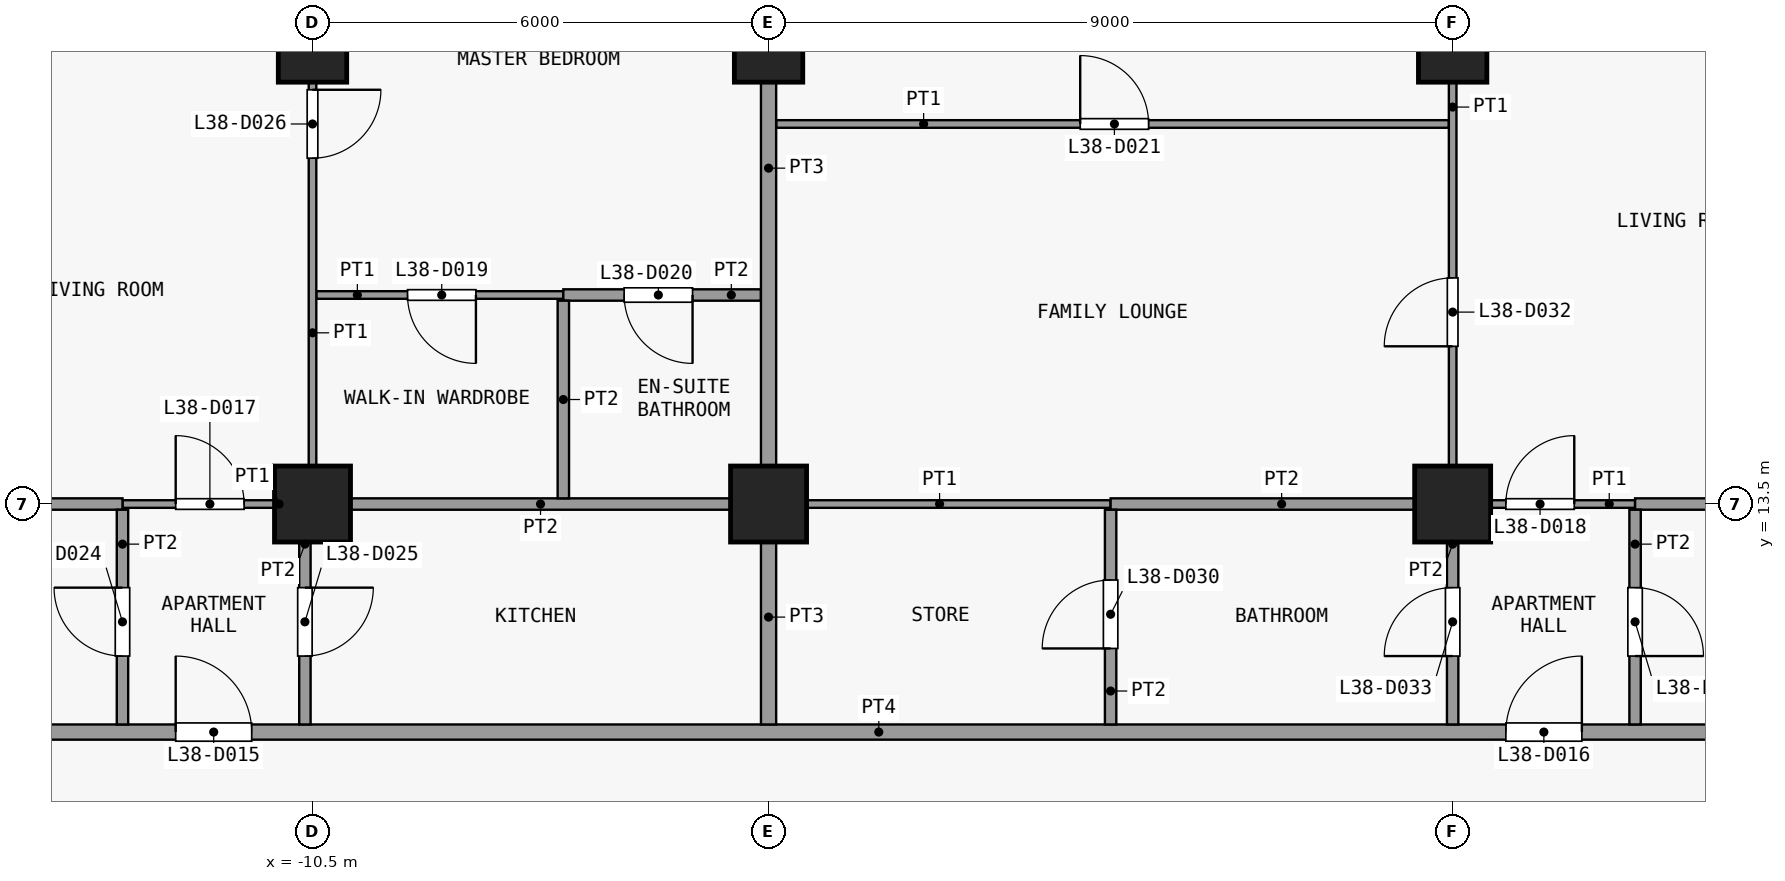
"""IFC4 building model, lengths in metres.
Left out: names, types, materials, properties, quantities, classifications, styles, units other than length and angle.
Written with IfcOpenShell. Run it as: python <this file> out.ifc"""

import sys

from ifc_helpers import new_model, si_unit, direction, frame, frame_2d, origin, origin_2d, place, context, subcontext, project, spatial, rectangle, extrude, element, fill, save


model = new_model("IFC4")
c1 = context("Model", 3, precision=1e-05, world=origin(), true_north=direction((0.0, 1.0)))
c2 = subcontext(c1, "Body", "Model", "MODEL_VIEW")
j1 = project(units=[si_unit("LENGTHUNIT", "METRE"), si_unit("PLANEANGLEUNIT", "RADIAN")], contexts=[c1])
p1 = place(None, origin())
s1 = spatial("IfcSite", under=j1, at=p1, CompositionType="ELEMENT")
p2 = place(p1, origin())
s2 = spatial("IfcBuilding", under=s1, at=p2, CompositionType="ELEMENT")
p3 = place(p2, frame((0.0, 0.0, 156.5)))
s3 = spatial("IfcBuildingStorey", under=s2, at=p3, CompositionType="ELEMENT", Elevation=156.5)
p4 = place(p3, frame((-10.5, 13.5, 0.0), z_axis=(0.0, 0.0, 1.0), x_axis=(1.0, 0.0, 0.0)))
e1 = element("IfcColumn", 1, at=p4, inside=s3, PredefinedType="COLUMN", context=c2, shape_type="SweptSolid", body=[
    extrude(rectangle(XDim=1.0, YDim=1.0, at=origin_2d()), origin(), (0.0, 0.0, 1.0), 3.6),
])
p5 = place(p3, frame((-10.5, 19.5, 0.0), z_axis=(0.0, 0.0, 1.0), x_axis=(1.0, 0.0, 0.0)))
e2 = element("IfcColumn", 2, at=p5, inside=s3, PredefinedType="COLUMN", context=c2, shape_type="SweptSolid", body=[
    extrude(rectangle(XDim=0.9, YDim=0.9, at=origin_2d()), origin(), (0.0, 0.0, 1.0), 3.6),
])
p6 = place(p3, frame((-4.5, 13.5, 0.0), z_axis=(0.0, 0.0, 1.0), x_axis=(1.0, 0.0, 0.0)))
e3 = element("IfcColumn", 3, at=p6, inside=s3, PredefinedType="COLUMN", context=c2, shape_type="SweptSolid", body=[
    extrude(rectangle(XDim=1.0, YDim=1.0, at=origin_2d()), origin(), (0.0, 0.0, 1.0), 3.6),
])
p7 = place(p3, frame((-4.5, 19.5, 0.0), z_axis=(0.0, 0.0, 1.0), x_axis=(1.0, 0.0, 0.0)))
e4 = element("IfcColumn", 4, at=p7, inside=s3, PredefinedType="COLUMN", context=c2, shape_type="SweptSolid", body=[
    extrude(rectangle(XDim=0.9, YDim=0.9, at=origin_2d()), origin(), (0.0, 0.0, 1.0), 3.6),
])
p8 = place(p3, frame((4.5, 13.5, 0.0), z_axis=(0.0, 0.0, 1.0), x_axis=(1.0, 0.0, 0.0)))
e5 = element("IfcColumn", 5, at=p8, inside=s3, PredefinedType="COLUMN", context=c2, shape_type="SweptSolid", body=[
    extrude(rectangle(XDim=1.0, YDim=1.0, at=origin_2d()), origin(), (0.0, 0.0, 1.0), 3.6),
])
p9 = place(p3, frame((4.5, 19.5, 0.0), z_axis=(0.0, 0.0, 1.0), x_axis=(1.0, 0.0, 0.0)))
e6 = element("IfcColumn", 6, at=p9, inside=s3, PredefinedType="COLUMN", context=c2, shape_type="SweptSolid", body=[
    extrude(rectangle(XDim=0.9, YDim=0.9, at=origin_2d()), origin(), (0.0, 0.0, 1.0), 3.6),
])
p10 = place(p3, frame((-19.35, 10.5, 0.0), z_axis=(0.0, 0.0, 1.0), x_axis=(1.0, 0.0, 0.0)))
e7 = element("IfcWall", 7, at=p10, inside=s3, PredefinedType="PARTITIONING", context=c2, shape_type="SweptSolid", body=[
    extrude(rectangle(XDim=37.2, YDim=0.2, at=frame_2d((18.6, 0.0))), origin(), (0.0, 0.0, 1.0), 3.3),
])
p11 = place(p10, frame((7.05, 0.0, 0.0)))
e8 = element("IfcOpeningElement", 8, at=p11, cuts=e7, PredefinedType="OPENING", context=c2, shape_type="SweptSolid", body=[
    extrude(rectangle(XDim=1.0, YDim=2.1, at=frame_2d((0.5, 1.05))), frame((0.0, 0.11, 0.0), z_axis=(0.0, -1.0, 0.0), x_axis=(1.0, 0.0, 0.0)), (0.0, 0.0, 1.0), 0.22),
])
p12 = place(p10, frame((24.55, 0.0, 0.0)))
e9 = element("IfcOpeningElement", 9, at=p12, cuts=e7, PredefinedType="OPENING", context=c2, shape_type="SweptSolid", body=[
    extrude(rectangle(XDim=1.0, YDim=2.1, at=frame_2d((0.5, 1.05))), frame((0.0, 0.11, 0.0), z_axis=(0.0, -1.0, 0.0), x_axis=(1.0, 0.0, 0.0)), (0.0, 0.0, 1.0), 0.22),
])
p13 = place(p3, frame((-13.0, 13.5, 0.0), z_axis=(0.0, 0.0, 1.0), x_axis=(1.0, 0.0, 0.0)))
e10 = element("IfcWall", 10, at=p13, inside=s3, PredefinedType="PARTITIONING", context=c2, shape_type="SweptSolid", body=[
    extrude(rectangle(XDim=2.4, YDim=0.1, at=frame_2d((1.2, 0.0))), origin(), (0.0, 0.0, 1.0), 3.3),
])
p14 = place(p13, frame((0.7, 0.0, 0.0)))
e11 = element("IfcOpeningElement", 11, at=p14, cuts=e10, PredefinedType="OPENING", context=c2, shape_type="SweptSolid", body=[
    extrude(rectangle(XDim=0.9, YDim=2.1, at=frame_2d((0.45, 1.05))), frame((0.0, 0.06, 0.0), z_axis=(0.0, -1.0, 0.0), x_axis=(1.0, 0.0, 0.0)), (0.0, 0.0, 1.0), 0.12),
])
p15 = place(p3, frame((-4.5, 13.5, 0.0), z_axis=(0.0, 0.0, 1.0), x_axis=(1.0, 0.0, 0.0)))
e12 = element("IfcWall", 12, at=p15, inside=s3, PredefinedType="PARTITIONING", context=c2, shape_type="SweptSolid", body=[
    extrude(rectangle(XDim=4.5, YDim=0.1, at=frame_2d((2.25, 0.0))), origin(), (0.0, 0.0, 1.0), 3.3),
])
p16 = place(p3, frame((4.5, 13.5, 0.0), z_axis=(0.0, 0.0, 1.0), x_axis=(1.0, 0.0, 0.0)))
e13 = element("IfcWall", 13, at=p16, inside=s3, PredefinedType="PARTITIONING", context=c2, shape_type="SweptSolid", body=[
    extrude(rectangle(XDim=2.4, YDim=0.1, at=frame_2d((1.2, 0.0))), origin(), (0.0, 0.0, 1.0), 3.3),
])
p17 = place(p16, frame((0.7, 0.0, 0.0)))
e14 = element("IfcOpeningElement", 14, at=p17, cuts=e13, PredefinedType="OPENING", context=c2, shape_type="SweptSolid", body=[
    extrude(rectangle(XDim=0.9, YDim=2.1, at=frame_2d((0.45, 1.05))), frame((0.0, 0.06, 0.0), z_axis=(0.0, -1.0, 0.0), x_axis=(1.0, 0.0, 0.0)), (0.0, 0.0, 1.0), 0.12),
])
p18 = place(p3, frame((-16.75, 13.5, 0.0), z_axis=(0.0, 0.0, 1.0), x_axis=(1.0, 0.0, 0.0)))
e15 = element("IfcWall", 15, at=p18, inside=s3, PredefinedType="PARTITIONING", context=c2, shape_type="SweptSolid", body=[
    extrude(rectangle(XDim=3.75, YDim=0.15, at=frame_2d((1.875, 0.0))), origin(), (0.0, 0.0, 1.0), 3.3),
])
p19 = place(p3, frame((-10.5, 13.5, 0.0), z_axis=(0.0, 0.0, 1.0), x_axis=(1.0, 0.0, 0.0)))
e16 = element("IfcWall", 16, at=p19, inside=s3, PredefinedType="PARTITIONING", context=c2, shape_type="SweptSolid", body=[
    extrude(rectangle(XDim=6.0, YDim=0.15, at=frame_2d((3.0, 0.0))), origin(), (0.0, 0.0, 1.0), 3.3),
])
p20 = place(p3, frame((0.0, 13.5, 0.0), z_axis=(0.0, 0.0, 1.0), x_axis=(1.0, 0.0, 0.0)))
e17 = element("IfcWall", 17, at=p20, inside=s3, PredefinedType="PARTITIONING", context=c2, shape_type="SweptSolid", body=[
    extrude(rectangle(XDim=4.5, YDim=0.15, at=frame_2d((2.25, 0.0))), origin(), (0.0, 0.0, 1.0), 3.3),
])
p21 = place(p3, frame((6.9, 13.5, 0.0), z_axis=(0.0, 0.0, 1.0), x_axis=(1.0, 0.0, 0.0)))
e18 = element("IfcWall", 18, at=p21, inside=s3, PredefinedType="PARTITIONING", context=c2, shape_type="SweptSolid", body=[
    extrude(rectangle(XDim=10.95, YDim=0.15, at=frame_2d((5.475, 0.0))), origin(), (0.0, 0.0, 1.0), 3.3),
])
p22 = place(p3, frame((-10.45, 16.25, 0.0), z_axis=(0.0, 0.0, 1.0), x_axis=(1.0, 0.0, 0.0)))
e19 = element("IfcWall", 19, at=p22, inside=s3, PredefinedType="PARTITIONING", context=c2, shape_type="SweptSolid", body=[
    extrude(rectangle(XDim=3.25, YDim=0.1, at=frame_2d((1.625, 0.0))), origin(), (0.0, 0.0, 1.0), 3.3),
])
p23 = place(p22, frame((1.2, 0.0, 0.0)))
e20 = element("IfcOpeningElement", 20, at=p23, cuts=e19, PredefinedType="OPENING", context=c2, shape_type="SweptSolid", body=[
    extrude(rectangle(XDim=0.9, YDim=2.1, at=frame_2d((0.45, 1.05))), frame((0.0, 0.06, 0.0), z_axis=(0.0, -1.0, 0.0), x_axis=(1.0, 0.0, 0.0)), (0.0, 0.0, 1.0), 0.12),
])
p24 = place(p3, frame((-7.2, 16.25, 0.0), z_axis=(0.0, 0.0, 1.0), x_axis=(1.0, 0.0, 0.0)))
e21 = element("IfcWall", 21, at=p24, inside=s3, PredefinedType="PARTITIONING", context=c2, shape_type="SweptSolid", body=[
    extrude(rectangle(XDim=2.6, YDim=0.15, at=frame_2d((1.3, 0.0))), origin(), (0.0, 0.0, 1.0), 3.3),
])
p25 = place(p24, frame((0.8, 0.0, 0.0)))
e22 = element("IfcOpeningElement", 22, at=p25, cuts=e21, PredefinedType="OPENING", context=c2, shape_type="SweptSolid", body=[
    extrude(rectangle(XDim=0.9, YDim=2.1, at=frame_2d((0.45, 1.05))), frame((0.0, 0.085, 0.0), z_axis=(0.0, -1.0, 0.0), x_axis=(1.0, 0.0, 0.0)), (0.0, 0.0, 1.0), 0.17),
])
p26 = place(p3, frame((-4.4, 18.5, 0.0), z_axis=(0.0, 0.0, 1.0), x_axis=(1.0, 0.0, 0.0)))
e23 = element("IfcWall", 23, at=p26, inside=s3, PredefinedType="PARTITIONING", context=c2, shape_type="SweptSolid", body=[
    extrude(rectangle(XDim=8.85, YDim=0.1, at=frame_2d((4.425, 0.0))), origin(), (0.0, 0.0, 1.0), 3.3),
])
p27 = place(p26, frame((4.0, 0.0, 0.0)))
e24 = element("IfcOpeningElement", 24, at=p27, cuts=e23, PredefinedType="OPENING", context=c2, shape_type="SweptSolid", body=[
    extrude(rectangle(XDim=0.9, YDim=2.1, at=frame_2d((0.45, 1.05))), frame((0.0, 0.06, 0.0), z_axis=(0.0, -1.0, 0.0), x_axis=(1.0, 0.0, 0.0)), (0.0, 0.0, 1.0), 0.12),
])
p28 = place(p3, frame((-13.0, 10.6, 0.0), z_axis=(0.0, 0.0, 1.0), x_axis=(0.0, 1.0, 0.0)))
e25 = element("IfcWall", 25, at=p28, inside=s3, PredefinedType="PARTITIONING", context=c2, shape_type="SweptSolid", body=[
    extrude(rectangle(XDim=2.825, YDim=0.15, at=frame_2d((1.413, 0.0))), origin(), (0.0, 0.0, 1.0), 3.3),
])
p29 = place(p28, frame((0.9, 0.0, 0.0)))
e26 = element("IfcOpeningElement", 26, at=p29, cuts=e25, PredefinedType="OPENING", context=c2, shape_type="SweptSolid", body=[
    extrude(rectangle(XDim=0.9, YDim=2.1, at=frame_2d((0.45, 1.05))), frame((0.0, 0.085, 0.0), z_axis=(0.0, -1.0, 0.0), x_axis=(1.0, 0.0, 0.0)), (0.0, 0.0, 1.0), 0.17),
])
p30 = place(p3, frame((-10.6, 10.6, 0.0), z_axis=(0.0, 0.0, 1.0), x_axis=(0.0, 1.0, 0.0)))
e27 = element("IfcWall", 27, at=p30, inside=s3, PredefinedType="PARTITIONING", context=c2, shape_type="SweptSolid", body=[
    extrude(rectangle(XDim=2.825, YDim=0.15, at=frame_2d((1.413, 0.0))), origin(), (0.0, 0.0, 1.0), 3.3),
])
p31 = place(p30, frame((0.9, 0.0, 0.0)))
e28 = element("IfcOpeningElement", 28, at=p31, cuts=e27, PredefinedType="OPENING", context=c2, shape_type="SweptSolid", body=[
    extrude(rectangle(XDim=0.9, YDim=2.1, at=frame_2d((0.45, 1.05))), frame((0.0, 0.085, 0.0), z_axis=(0.0, -1.0, 0.0), x_axis=(1.0, 0.0, 0.0)), (0.0, 0.0, 1.0), 0.17),
])
p32 = place(p3, frame((-10.5, 13.575, 0.0), z_axis=(0.0, 0.0, 1.0), x_axis=(0.0, 1.0, 0.0)))
e29 = element("IfcWall", 29, at=p32, inside=s3, PredefinedType="PARTITIONING", context=c2, shape_type="SweptSolid", body=[
    extrude(rectangle(XDim=8.688, YDim=0.1, at=frame_2d((4.344, 0.0))), origin(), (0.0, 0.0, 1.0), 3.3),
])
p33 = place(p32, frame((4.475, 0.0, 0.0)))
e30 = element("IfcOpeningElement", 30, at=p33, cuts=e29, PredefinedType="OPENING", context=c2, shape_type="SweptSolid", body=[
    extrude(rectangle(XDim=0.9, YDim=2.1, at=frame_2d((0.45, 1.05))), frame((0.0, 0.06, 0.0), z_axis=(0.0, -1.0, 0.0), x_axis=(1.0, 0.0, 0.0)), (0.0, 0.0, 1.0), 0.12),
])
p34 = place(p3, frame((-7.2, 13.575, 0.0), z_axis=(0.0, 0.0, 1.0), x_axis=(0.0, 1.0, 0.0)))
e31 = element("IfcWall", 31, at=p34, inside=s3, PredefinedType="PARTITIONING", context=c2, shape_type="SweptSolid", body=[
    extrude(rectangle(XDim=2.6, YDim=0.15, at=frame_2d((1.3, 0.0))), origin(), (0.0, 0.0, 1.0), 3.3),
])
p35 = place(p3, frame((-4.5, 10.6, 0.0), z_axis=(0.0, 0.0, 1.0), x_axis=(0.0, 1.0, 0.0)))
e32 = element("IfcWall", 32, at=p35, inside=s3, PredefinedType="PARTITIONING", context=c2, shape_type="SweptSolid", body=[
    extrude(rectangle(XDim=2.825, YDim=0.2, at=frame_2d((1.413, 0.0))), origin(), (0.0, 0.0, 1.0), 3.3),
])
p36 = place(p3, frame((-4.5, 13.575, 0.0), z_axis=(0.0, 0.0, 1.0), x_axis=(0.0, 1.0, 0.0)))
e33 = element("IfcWall", 33, at=p36, inside=s3, PredefinedType="PARTITIONING", context=c2, shape_type="SweptSolid", body=[
    extrude(rectangle(XDim=8.688, YDim=0.2, at=frame_2d((4.344, 0.0))), origin(), (0.0, 0.0, 1.0), 3.3),
])
p37 = place(p3, frame((0.0, 10.6, 0.0), z_axis=(0.0, 0.0, 1.0), x_axis=(0.0, 1.0, 0.0)))
e34 = element("IfcWall", 34, at=p37, inside=s3, PredefinedType="PARTITIONING", context=c2, shape_type="SweptSolid", body=[
    extrude(rectangle(XDim=2.825, YDim=0.15, at=frame_2d((1.413, 0.0))), origin(), (0.0, 0.0, 1.0), 3.3),
])
p38 = place(p37, frame((1.0, 0.0, 0.0)))
e35 = element("IfcOpeningElement", 35, at=p38, cuts=e34, PredefinedType="OPENING", context=c2, shape_type="SweptSolid", body=[
    extrude(rectangle(XDim=0.9, YDim=2.1, at=frame_2d((0.45, 1.05))), frame((0.0, 0.085, 0.0), z_axis=(0.0, -1.0, 0.0), x_axis=(1.0, 0.0, 0.0)), (0.0, 0.0, 1.0), 0.17),
])
p39 = place(p3, frame((4.5, 13.575, 0.0), z_axis=(0.0, 0.0, 1.0), x_axis=(0.0, 1.0, 0.0)))
e36 = element("IfcWall", 36, at=p39, inside=s3, PredefinedType="PARTITIONING", context=c2, shape_type="SweptSolid", body=[
    extrude(rectangle(XDim=7.275, YDim=0.1, at=frame_2d((3.638, 0.0))), origin(), (0.0, 0.0, 1.0), 3.3),
])
p40 = place(p39, frame((2.0, 0.0, 0.0)))
e37 = element("IfcOpeningElement", 37, at=p40, cuts=e36, PredefinedType="OPENING", context=c2, shape_type="SweptSolid", body=[
    extrude(rectangle(XDim=0.9, YDim=2.1, at=frame_2d((0.45, 1.05))), frame((0.0, 0.06, 0.0), z_axis=(0.0, -1.0, 0.0), x_axis=(1.0, 0.0, 0.0)), (0.0, 0.0, 1.0), 0.12),
])
p41 = place(p3, frame((4.5, 10.6, 0.0), z_axis=(0.0, 0.0, 1.0), x_axis=(0.0, 1.0, 0.0)))
e38 = element("IfcWall", 38, at=p41, inside=s3, PredefinedType="PARTITIONING", context=c2, shape_type="SweptSolid", body=[
    extrude(rectangle(XDim=2.825, YDim=0.15, at=frame_2d((1.413, 0.0))), origin(), (0.0, 0.0, 1.0), 3.3),
])
p42 = place(p41, frame((0.9, 0.0, 0.0)))
e39 = element("IfcOpeningElement", 39, at=p42, cuts=e38, PredefinedType="OPENING", context=c2, shape_type="SweptSolid", body=[
    extrude(rectangle(XDim=0.9, YDim=2.1, at=frame_2d((0.45, 1.05))), frame((0.0, 0.085, 0.0), z_axis=(0.0, -1.0, 0.0), x_axis=(1.0, 0.0, 0.0)), (0.0, 0.0, 1.0), 0.17),
])
p43 = place(p3, frame((6.9, 10.6, 0.0), z_axis=(0.0, 0.0, 1.0), x_axis=(0.0, 1.0, 0.0)))
e40 = element("IfcWall", 40, at=p43, inside=s3, PredefinedType="PARTITIONING", context=c2, shape_type="SweptSolid", body=[
    extrude(rectangle(XDim=2.825, YDim=0.15, at=frame_2d((1.413, 0.0))), origin(), (0.0, 0.0, 1.0), 3.3),
])
p44 = place(p43, frame((0.9, 0.0, 0.0)))
e41 = element("IfcOpeningElement", 41, at=p44, cuts=e40, PredefinedType="OPENING", context=c2, shape_type="SweptSolid", body=[
    extrude(rectangle(XDim=0.9, YDim=2.1, at=frame_2d((0.45, 1.05))), frame((0.0, 0.085, 0.0), z_axis=(0.0, -1.0, 0.0), x_axis=(1.0, 0.0, 0.0)), (0.0, 0.0, 1.0), 0.17),
])
p45 = place(p11, origin())
e42 = element("IfcDoor", 42, at=p45, inside=s3, OperationType="SINGLE_SWING_RIGHT", PredefinedType="DOOR", context=c2, shape_type="SweptSolid", body=[
    extrude(rectangle(XDim=1.0, YDim=2.1, at=frame_2d((0.5, 1.05))), frame((0.0, 0.025, 0.0), z_axis=(0.0, -1.0, 0.0), x_axis=(1.0, 0.0, 0.0)), (0.0, 0.0, 1.0), 0.05),
])
fill(e8, e42)
p46 = place(p12, origin())
e43 = element("IfcDoor", 43, at=p46, inside=s3, OperationType="SINGLE_SWING_LEFT", PredefinedType="DOOR", context=c2, shape_type="SweptSolid", body=[
    extrude(rectangle(XDim=1.0, YDim=2.1, at=frame_2d((0.5, 1.05))), frame((0.0, 0.025, 0.0), z_axis=(0.0, -1.0, 0.0), x_axis=(1.0, 0.0, 0.0)), (0.0, 0.0, 1.0), 0.05),
])
fill(e9, e43)
p47 = place(p14, origin())
e44 = element("IfcDoor", 44, at=p47, inside=s3, OperationType="SINGLE_SWING_RIGHT", PredefinedType="DOOR", context=c2, shape_type="SweptSolid", body=[
    extrude(rectangle(XDim=0.9, YDim=2.1, at=frame_2d((0.45, 1.05))), frame((0.0, 0.025, 0.0), z_axis=(0.0, -1.0, 0.0), x_axis=(1.0, 0.0, 0.0)), (0.0, 0.0, 1.0), 0.05),
])
fill(e11, e44)
p48 = place(p17, origin())
e45 = element("IfcDoor", 45, at=p48, inside=s3, OperationType="SINGLE_SWING_LEFT", PredefinedType="DOOR", context=c2, shape_type="SweptSolid", body=[
    extrude(rectangle(XDim=0.9, YDim=2.1, at=frame_2d((0.45, 1.05))), frame((0.0, 0.025, 0.0), z_axis=(0.0, -1.0, 0.0), x_axis=(1.0, 0.0, 0.0)), (0.0, 0.0, 1.0), 0.05),
])
fill(e14, e45)
p49 = place(p23, origin())
e46 = element("IfcDoor", 46, at=p49, inside=s3, OperationType="SINGLE_SWING_RIGHT", PredefinedType="DOOR", context=c2, shape_type="SweptSolid", body=[
    extrude(rectangle(XDim=0.9, YDim=2.1, at=frame_2d((0.45, 1.05))), frame((0.0, 0.025, 0.0), z_axis=(0.0, -1.0, 0.0), x_axis=(1.0, 0.0, 0.0)), (0.0, 0.0, 1.0), 0.05),
])
fill(e20, e46)
p50 = place(p25, origin())
e47 = element("IfcDoor", 47, at=p50, inside=s3, OperationType="SINGLE_SWING_RIGHT", PredefinedType="DOOR", context=c2, shape_type="SweptSolid", body=[
    extrude(rectangle(XDim=0.9, YDim=2.1, at=frame_2d((0.45, 1.05))), frame((0.0, 0.025, 0.0), z_axis=(0.0, -1.0, 0.0), x_axis=(1.0, 0.0, 0.0)), (0.0, 0.0, 1.0), 0.05),
])
fill(e22, e47)
p51 = place(p27, origin())
e48 = element("IfcDoor", 48, at=p51, inside=s3, OperationType="SINGLE_SWING_RIGHT", PredefinedType="DOOR", context=c2, shape_type="SweptSolid", body=[
    extrude(rectangle(XDim=0.9, YDim=2.1, at=frame_2d((0.45, 1.05))), frame((0.0, 0.025, 0.0), z_axis=(0.0, -1.0, 0.0), x_axis=(1.0, 0.0, 0.0)), (0.0, 0.0, 1.0), 0.05),
])
fill(e24, e48)
p52 = place(p29, origin())
e49 = element("IfcDoor", 49, at=p52, inside=s3, OperationType="SINGLE_SWING_LEFT", PredefinedType="DOOR", context=c2, shape_type="SweptSolid", body=[
    extrude(rectangle(XDim=0.9, YDim=2.1, at=frame_2d((0.45, 1.05))), frame((0.0, 0.025, 0.0), z_axis=(0.0, -1.0, 0.0), x_axis=(1.0, 0.0, 0.0)), (0.0, 0.0, 1.0), 0.05),
])
fill(e26, e49)
p53 = place(p31, origin())
e50 = element("IfcDoor", 50, at=p53, inside=s3, OperationType="SINGLE_SWING_RIGHT", PredefinedType="DOOR", context=c2, shape_type="SweptSolid", body=[
    extrude(rectangle(XDim=0.9, YDim=2.1, at=frame_2d((0.45, 1.05))), frame((0.0, 0.025, 0.0), z_axis=(0.0, -1.0, 0.0), x_axis=(1.0, 0.0, 0.0)), (0.0, 0.0, 1.0), 0.05),
])
fill(e28, e50)
p54 = place(p33, origin())
e51 = element("IfcDoor", 51, at=p54, inside=s3, OperationType="SINGLE_SWING_RIGHT", PredefinedType="DOOR", context=c2, shape_type="SweptSolid", body=[
    extrude(rectangle(XDim=0.9, YDim=2.1, at=frame_2d((0.45, 1.05))), frame((0.0, 0.025, 0.0), z_axis=(0.0, -1.0, 0.0), x_axis=(1.0, 0.0, 0.0)), (0.0, 0.0, 1.0), 0.05),
])
fill(e30, e51)
p55 = place(p38, origin())
e52 = element("IfcDoor", 52, at=p55, inside=s3, OperationType="SINGLE_SWING_RIGHT", PredefinedType="DOOR", context=c2, shape_type="SweptSolid", body=[
    extrude(rectangle(XDim=0.9, YDim=2.1, at=frame_2d((0.45, 1.05))), frame((0.0, 0.025, 0.0), z_axis=(0.0, -1.0, 0.0), x_axis=(1.0, 0.0, 0.0)), (0.0, 0.0, 1.0), 0.05),
])
fill(e35, e52)
p56 = place(p40, origin())
e53 = element("IfcDoor", 53, at=p56, inside=s3, OperationType="SINGLE_SWING_RIGHT", PredefinedType="DOOR", context=c2, shape_type="SweptSolid", body=[
    extrude(rectangle(XDim=0.9, YDim=2.1, at=frame_2d((0.45, 1.05))), frame((0.0, 0.025, 0.0), z_axis=(0.0, -1.0, 0.0), x_axis=(1.0, 0.0, 0.0)), (0.0, 0.0, 1.0), 0.05),
])
fill(e37, e53)
p57 = place(p42, origin())
e54 = element("IfcDoor", 54, at=p57, inside=s3, OperationType="SINGLE_SWING_RIGHT", PredefinedType="DOOR", context=c2, shape_type="SweptSolid", body=[
    extrude(rectangle(XDim=0.9, YDim=2.1, at=frame_2d((0.45, 1.05))), frame((0.0, 0.025, 0.0), z_axis=(0.0, -1.0, 0.0), x_axis=(1.0, 0.0, 0.0)), (0.0, 0.0, 1.0), 0.05),
])
fill(e39, e54)
p58 = place(p44, origin())
e55 = element("IfcDoor", 55, at=p58, inside=s3, OperationType="SINGLE_SWING_LEFT", PredefinedType="DOOR", context=c2, shape_type="SweptSolid", body=[
    extrude(rectangle(XDim=0.9, YDim=2.1, at=frame_2d((0.45, 1.05))), frame((0.0, 0.025, 0.0), z_axis=(0.0, -1.0, 0.0), x_axis=(1.0, 0.0, 0.0)), (0.0, 0.0, 1.0), 0.05),
])
fill(e41, e55)
save(model, sys.argv[1])
